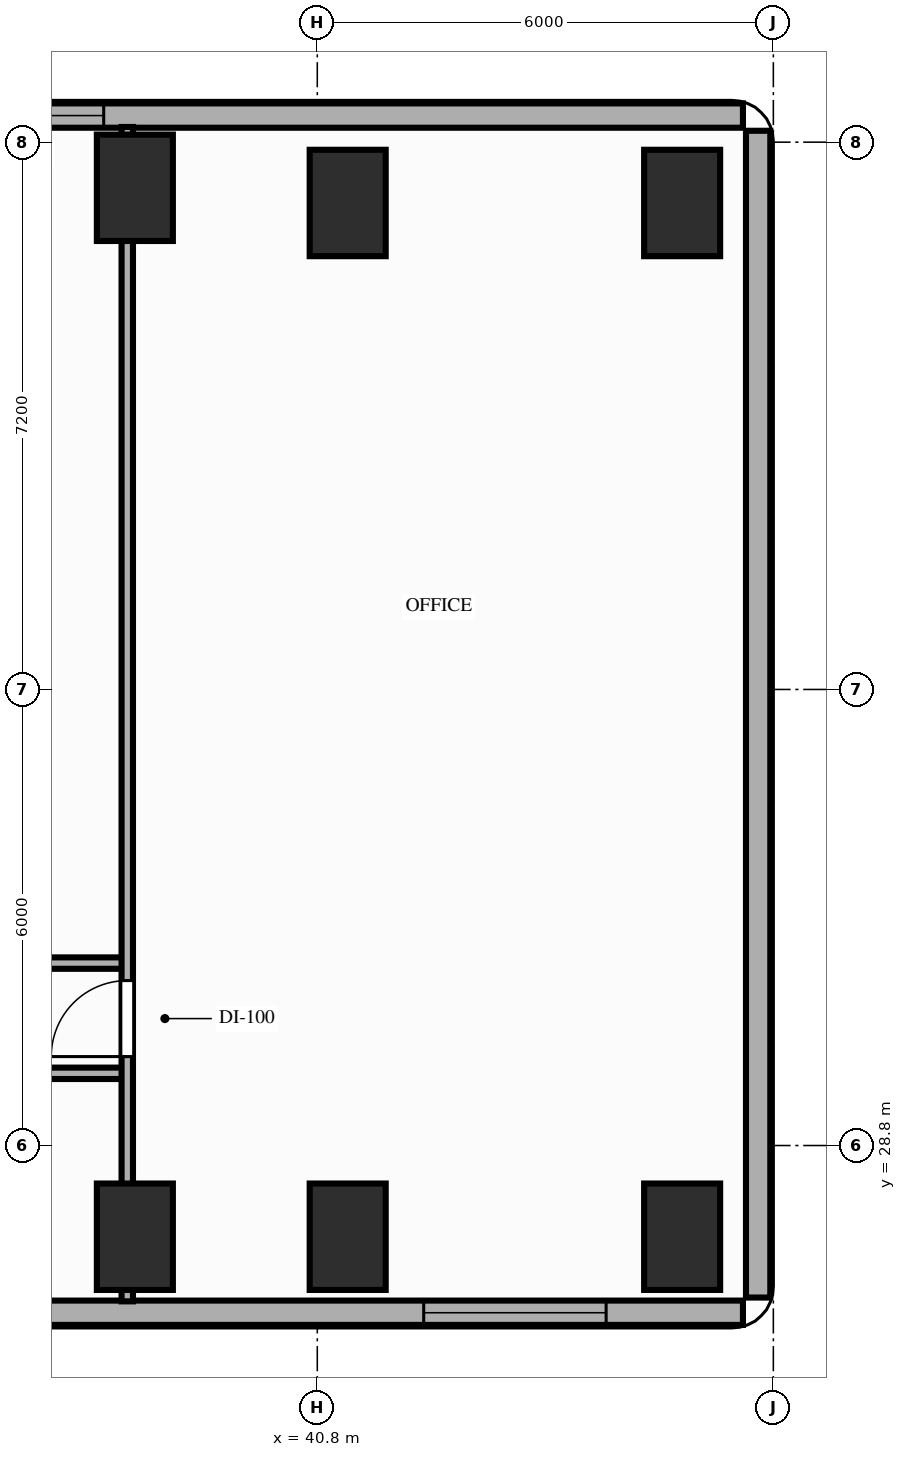
"""IFC4 building model, lengths in metres.
Left out: names, types, materials, properties, quantities, classifications, styles, units other than length and angle.
Written with IfcOpenShell. Run it as: python <this file> out.ifc"""

import sys

from ifc_helpers import new_model, si_unit, direction, frame, frame_2d, origin, origin_2d, place, context, subcontext, project, spatial, rectangle, extrude, element, fill, save


model = new_model("IFC4")
c1 = context("Model", 3, precision=1e-05, world=origin(), true_north=direction((0.0, 1.0)))
c2 = subcontext(c1, "Body", "Model", "MODEL_VIEW")
j1 = project(units=[si_unit("LENGTHUNIT", "METRE"), si_unit("PLANEANGLEUNIT", "RADIAN")], contexts=[c1])
p1 = place(None, origin())
s1 = spatial("IfcSite", under=j1, at=p1, CompositionType="ELEMENT")
p2 = place(p1, origin())
s2 = spatial("IfcBuilding", under=s1, at=p2, CompositionType="ELEMENT")
p3 = place(p2, frame((0.0, 0.0, 66.0)))
s3 = spatial("IfcBuildingStorey", under=s2, at=p3, CompositionType="ELEMENT", Elevation=66.0)
for number, where, z_axis, x_axis in (
    (1, (38.4, 27.6, 0.0), (0.0, 0.0, 1.0), (1.0, 0.0, 0.0)),
    (2, (38.4, 41.4, 0.0), (0.0, 0.0, 1.0), (1.0, 0.0, 0.0)),
    (3, (41.2, 27.6, 0.0), (0.0, 0.0, 1.0), (1.0, 0.0, 0.0)),
    (4, (41.2, 41.2, 0.0), (0.0, 0.0, 1.0), (1.0, 0.0, 0.0)),
    (5, (45.6, 27.6, 0.0), (0.0, 0.0, 1.0), (1.0, 0.0, 0.0)),
    (6, (45.6, 41.2, 0.0), (0.0, 0.0, 1.0), (1.0, 0.0, 0.0)),
):
    element("IfcColumn", number, at=place(p3, frame(where, z_axis=z_axis, x_axis=x_axis)), inside=s3, PredefinedType="COLUMN", context=c2, shape_type="SweptSolid", body=[
        extrude(rectangle(XDim=1.0, YDim=1.4, at=origin_2d()), origin(), (0.0, 0.0, 1.0), 3.2),
    ])
p4 = place(p3, frame((46.4, 42.35, 0.0), z_axis=(0.0, 0.0, 1.0), x_axis=(-1.0, 0.0, 0.0)))
e7 = element("IfcWall", 7, at=p4, inside=s3, PredefinedType="STANDARD", context=c2, shape_type="SweptSolid", body=[
    extrude(rectangle(XDim=19.05, YDim=0.32, at=frame_2d((9.525, 0.0))), origin(), (0.0, 0.0, 1.0), 2.41),
])
p5 = place(p4, frame((8.41, 0.0, 0.85)))
e8 = element("IfcOpeningElement", 8, at=p5, cuts=e7, PredefinedType="OPENING", context=c2, shape_type="SweptSolid", body=[
    extrude(rectangle(XDim=2.4, YDim=1.31, at=frame_2d((1.2, 0.655))), frame((0.0, 0.17, 0.0), z_axis=(0.0, -1.0, 0.0), x_axis=(1.0, 0.0, 0.0)), (0.0, 0.0, 1.0), 0.34),
])
p6 = place(p3, frame((20.25, 26.6, 0.0), z_axis=(0.0, 0.0, 1.0), x_axis=(1.0, 0.0, 0.0)))
e9 = element("IfcWall", 9, at=p6, inside=s3, PredefinedType="STANDARD", context=c2, shape_type="SweptSolid", body=[
    extrude(rectangle(XDim=26.15, YDim=0.32, at=frame_2d((13.075, 0.0))), origin(), (0.0, 0.0, 1.0), 2.7),
])
p7 = place(p6, frame((1.95, 0.0, 0.85)))
e10 = element("IfcOpeningElement", 10, at=p7, cuts=e9, PredefinedType="OPENING", context=c2, shape_type="SweptSolid", body=[
    extrude(rectangle(XDim=2.4, YDim=1.6, at=frame_2d((1.2, 0.8))), frame((0.0, 0.17, 0.0), z_axis=(0.0, -1.0, 0.0), x_axis=(1.0, 0.0, 0.0)), (0.0, 0.0, 1.0), 0.34),
])
p8 = place(p6, frame((7.45, 0.0, 0.85)))
e11 = element("IfcOpeningElement", 11, at=p8, cuts=e9, PredefinedType="OPENING", context=c2, shape_type="SweptSolid", body=[
    extrude(rectangle(XDim=2.4, YDim=1.6, at=frame_2d((1.2, 0.8))), frame((0.0, 0.17, 0.0), z_axis=(0.0, -1.0, 0.0), x_axis=(1.0, 0.0, 0.0)), (0.0, 0.0, 1.0), 0.34),
])
p9 = place(p6, frame((21.95, 0.0, 0.85)))
e12 = element("IfcOpeningElement", 12, at=p9, cuts=e9, PredefinedType="OPENING", context=c2, shape_type="SweptSolid", body=[
    extrude(rectangle(XDim=2.4, YDim=1.6, at=frame_2d((1.2, 0.8))), frame((0.0, 0.17, 0.0), z_axis=(0.0, -1.0, 0.0), x_axis=(1.0, 0.0, 0.0)), (0.0, 0.0, 1.0), 0.34),
])
p10 = place(p3, frame((46.6, 26.8, 0.0), z_axis=(0.0, 0.0, 1.0), x_axis=(0.0, 1.0, 0.0)))
e13 = element("IfcWall", 13, at=p10, inside=s3, PredefinedType="STANDARD", context=c2, shape_type="SweptSolid", body=[
    extrude(rectangle(XDim=15.35, YDim=0.32, at=frame_2d((7.675, 0.0))), origin(), (0.0, 0.0, 1.0), 3.02),
])
p11 = place(p3, frame((27.15, 29.75, 0.0), z_axis=(0.0, 0.0, 1.0), x_axis=(1.0, 0.0, 0.0)))
e14 = element("IfcWall", 14, at=p11, inside=s3, PredefinedType="PARTITIONING", context=c2, shape_type="SweptSolid", body=[
    extrude(rectangle(XDim=11.15, YDim=0.15, at=frame_2d((5.575, 0.0))), origin(), (0.0, 0.0, 1.0), 2.41),
])
p12 = place(p11, frame((1.59, 0.0, 0.0)))
e15 = element("IfcOpeningElement", 15, at=p12, cuts=e14, PredefinedType="OPENING", context=c2, shape_type="SweptSolid", body=[
    extrude(rectangle(XDim=0.95, YDim=2.15, at=frame_2d((0.475, 1.075))), frame((0.0, 0.085, 0.0), z_axis=(0.0, -1.0, 0.0), x_axis=(1.0, 0.0, 0.0)), (0.0, 0.0, 1.0), 0.17),
])
p13 = place(p11, frame((7.16, 0.0, 0.0)))
e16 = element("IfcOpeningElement", 16, at=p13, cuts=e14, PredefinedType="OPENING", context=c2, shape_type="SweptSolid", body=[
    extrude(rectangle(XDim=0.95, YDim=2.15, at=frame_2d((0.475, 1.075))), frame((0.0, 0.085, 0.0), z_axis=(0.0, -1.0, 0.0), x_axis=(1.0, 0.0, 0.0)), (0.0, 0.0, 1.0), 0.17),
])
p14 = place(p3, frame((27.15, 31.2, 0.0), z_axis=(0.0, 0.0, 1.0), x_axis=(1.0, 0.0, 0.0)))
e17 = element("IfcWall", 17, at=p14, inside=s3, PredefinedType="PARTITIONING", context=c2, shape_type="SweptSolid", body=[
    extrude(rectangle(XDim=11.15, YDim=0.15, at=frame_2d((5.575, 0.0))), origin(), (0.0, 0.0, 1.0), 2.41),
])
p15 = place(p14, frame((1.31, 0.0, 0.0)))
e18 = element("IfcOpeningElement", 18, at=p15, cuts=e17, PredefinedType="OPENING", context=c2, shape_type="SweptSolid", body=[
    extrude(rectangle(XDim=0.95, YDim=2.15, at=frame_2d((0.475, 1.075))), frame((0.0, 0.085, 0.0), z_axis=(0.0, -1.0, 0.0), x_axis=(1.0, 0.0, 0.0)), (0.0, 0.0, 1.0), 0.17),
])
p16 = place(p14, frame((5.37, 0.0, 0.0)))
e19 = element("IfcOpeningElement", 19, at=p16, cuts=e17, PredefinedType="OPENING", context=c2, shape_type="SweptSolid", body=[
    extrude(rectangle(XDim=0.95, YDim=2.15, at=frame_2d((0.475, 1.075))), frame((0.0, 0.085, 0.0), z_axis=(0.0, -1.0, 0.0), x_axis=(1.0, 0.0, 0.0)), (0.0, 0.0, 1.0), 0.17),
])
p17 = place(p14, frame((9.17, 0.0, 0.0)))
e20 = element("IfcOpeningElement", 20, at=p17, cuts=e17, PredefinedType="OPENING", context=c2, shape_type="SweptSolid", body=[
    extrude(rectangle(XDim=0.95, YDim=2.15, at=frame_2d((0.475, 1.075))), frame((0.0, 0.085, 0.0), z_axis=(0.0, -1.0, 0.0), x_axis=(1.0, 0.0, 0.0)), (0.0, 0.0, 1.0), 0.17),
])
p18 = place(p3, frame((38.3, 26.75, 0.0), z_axis=(0.0, 0.0, 1.0), x_axis=(0.0, 1.0, 0.0)))
e21 = element("IfcWall", 21, at=p18, inside=s3, PredefinedType="PARTITIONING", context=c2, shape_type="SweptSolid", body=[
    extrude(rectangle(XDim=15.45, YDim=0.15, at=frame_2d((7.725, 0.0))), origin(), (0.0, 0.0, 1.0), 2.41),
])
p19 = place(p18, frame((3.22, 0.0, 0.0)))
e22 = element("IfcOpeningElement", 22, at=p19, cuts=e21, PredefinedType="OPENING", context=c2, shape_type="SweptSolid", body=[
    extrude(rectangle(XDim=1.0, YDim=2.15, at=frame_2d((0.5, 1.075))), frame((0.0, 0.085, 0.0), z_axis=(0.0, -1.0, 0.0), x_axis=(1.0, 0.0, 0.0)), (0.0, 0.0, 1.0), 0.17),
])
p20 = place(p5, origin())
e23 = element("IfcWindow", 23, at=p20, inside=s3, PartitioningType="SINGLE_PANEL", PredefinedType="WINDOW", context=c2, shape_type="SweptSolid", body=[
    extrude(rectangle(XDim=2.4, YDim=1.31, at=frame_2d((1.2, 0.655))), frame((0.0, 0.03, 0.0), z_axis=(0.0, -1.0, 0.0), x_axis=(1.0, 0.0, 0.0)), (0.0, 0.0, 1.0), 0.06),
])
fill(e8, e23)
p21 = place(p9, origin())
e24 = element("IfcWindow", 24, at=p21, inside=s3, PartitioningType="SINGLE_PANEL", PredefinedType="WINDOW", context=c2, shape_type="SweptSolid", body=[
    extrude(rectangle(XDim=2.4, YDim=1.6, at=frame_2d((1.2, 0.8))), frame((0.0, 0.03, 0.0), z_axis=(0.0, -1.0, 0.0), x_axis=(1.0, 0.0, 0.0)), (0.0, 0.0, 1.0), 0.06),
])
fill(e12, e24)
p22 = place(p19, origin())
e25 = element("IfcDoor", 25, at=p22, inside=s3, OperationType="SINGLE_SWING_LEFT", PredefinedType="DOOR", context=c2, shape_type="SweptSolid", body=[
    extrude(rectangle(XDim=1.0, YDim=2.15, at=frame_2d((0.5, 1.075))), frame((0.0, 0.025, 0.0), z_axis=(0.0, -1.0, 0.0), x_axis=(1.0, 0.0, 0.0)), (0.0, 0.0, 1.0), 0.05),
])
fill(e22, e25)
save(model, sys.argv[1])
